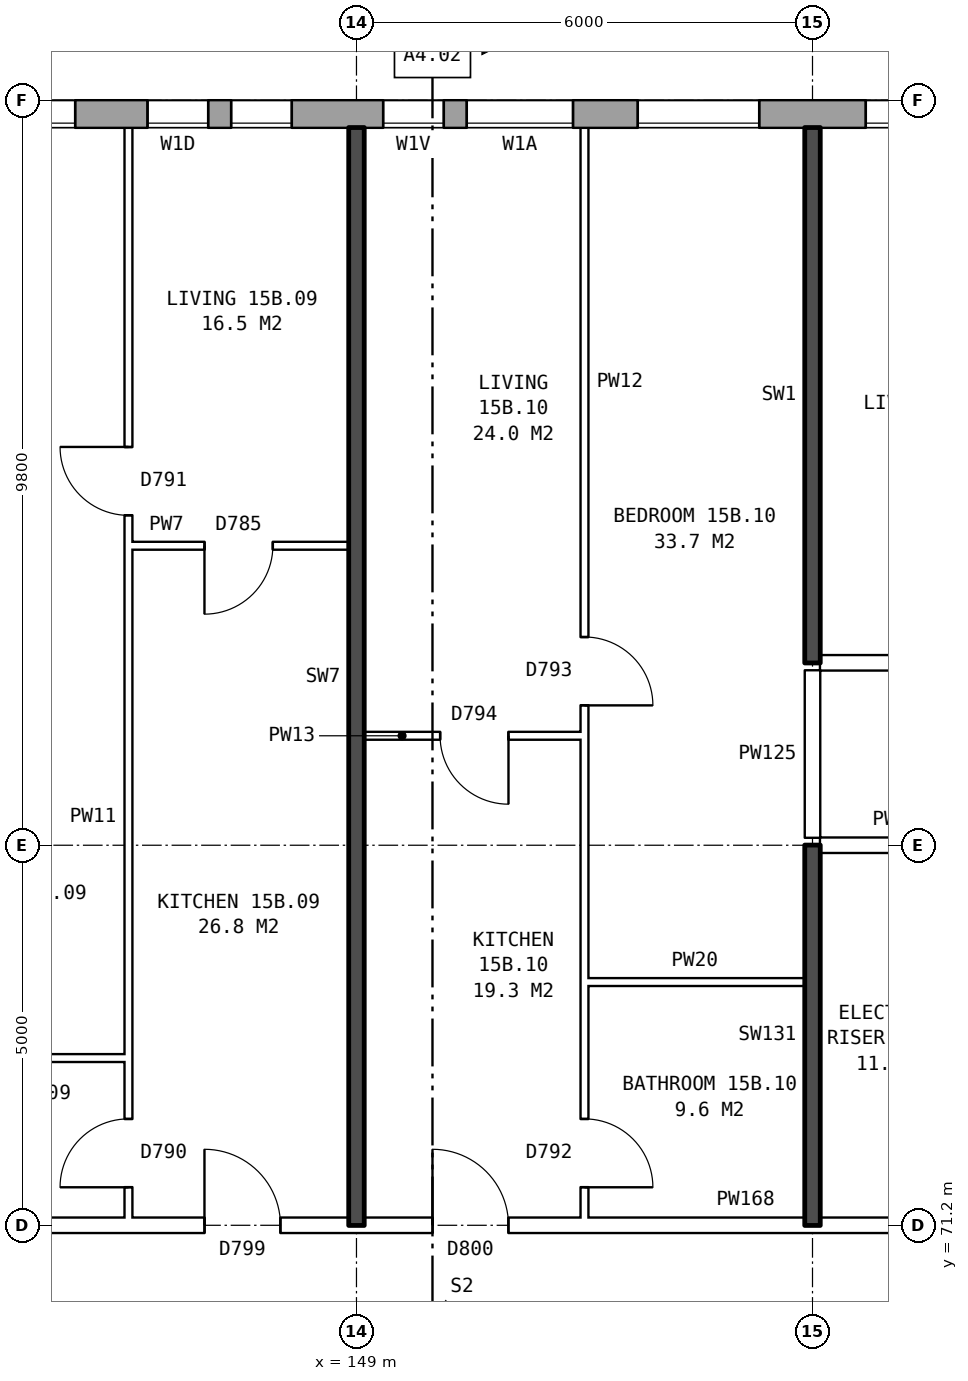
"""IFC4 building model, lengths in metres.
Left out: names, types, materials, properties, quantities, classifications, styles, units other than length and angle.
Written with IfcOpenShell. Run it as: python <this file> out.ifc"""

import sys

from ifc_helpers import new_model, si_unit, direction, frame, frame_2d, origin, place, context, subcontext, project, spatial, rectangle, extrude, element, fill, save


model = new_model("IFC4")
c1 = context("Model", 3, precision=1e-05, world=origin(), true_north=direction((0.0, 1.0)))
c2 = subcontext(c1, "Body", "Model", "MODEL_VIEW")
j1 = project(units=[si_unit("LENGTHUNIT", "METRE"), si_unit("PLANEANGLEUNIT", "RADIAN")], contexts=[c1])
p1 = place(None, origin())
s1 = spatial("IfcSite", under=j1, at=p1, CompositionType="ELEMENT")
p2 = place(p1, origin())
s2 = spatial("IfcBuilding", under=s1, at=p2, CompositionType="ELEMENT")
p3 = place(p2, frame((0.0, 0.0, 56.7)))
s3 = spatial("IfcBuildingStorey", under=s2, at=p3, CompositionType="ELEMENT", Elevation=56.7)
p4 = place(p3, frame((173.425, 85.82, 0.0), z_axis=(0.0, 0.0, 1.0), x_axis=(-1.0, 0.0, 0.0)))
e1 = element("IfcWall", 1, at=p4, inside=s3, PredefinedType="STANDARD", context=c2, shape_type="SweptSolid", body=[
    extrude(rectangle(XDim=39.351, YDim=0.36, at=frame_2d((19.675, 0.0))), origin(), (0.0, 0.0, 1.0), 2.85),
])
p5 = place(p4, frame((1.125, 0.0, 0.8)))
e2 = element("IfcOpeningElement", 2, at=p5, cuts=e1, PredefinedType="OPENING", context=c2, shape_type="SweptSolid", body=[
    extrude(rectangle(XDim=1.6, YDim=1.8, at=frame_2d((0.8, 0.9))), frame((0.0, 0.19, 0.0), z_axis=(0.0, -1.0, 0.0), x_axis=(1.0, 0.0, 0.0)), (0.0, 0.0, 1.0), 0.38),
])
p6 = place(p4, frame((4.125, 0.0, 0.8)))
e3 = element("IfcOpeningElement", 3, at=p6, cuts=e1, PredefinedType="OPENING", context=c2, shape_type="SweptSolid", body=[
    extrude(rectangle(XDim=1.6, YDim=1.8, at=frame_2d((0.8, 0.9))), frame((0.0, 0.19, 0.0), z_axis=(0.0, -1.0, 0.0), x_axis=(1.0, 0.0, 0.0)), (0.0, 0.0, 1.0), 0.38),
])
p7 = place(p4, frame((7.125, 0.0, 0.8)))
e4 = element("IfcOpeningElement", 4, at=p7, cuts=e1, PredefinedType="OPENING", context=c2, shape_type="SweptSolid", body=[
    extrude(rectangle(XDim=1.6, YDim=1.8, at=frame_2d((0.8, 0.9))), frame((0.0, 0.19, 0.0), z_axis=(0.0, -1.0, 0.0), x_axis=(1.0, 0.0, 0.0)), (0.0, 0.0, 1.0), 0.38),
])
p8 = place(p4, frame((10.125, 0.0, 0.8)))
e5 = element("IfcOpeningElement", 5, at=p8, cuts=e1, PredefinedType="OPENING", context=c2, shape_type="SweptSolid", body=[
    extrude(rectangle(XDim=1.6, YDim=1.8, at=frame_2d((0.8, 0.9))), frame((0.0, 0.19, 0.0), z_axis=(0.0, -1.0, 0.0), x_axis=(1.0, 0.0, 0.0)), (0.0, 0.0, 1.0), 0.38),
])
p9 = place(p4, frame((12.625, 0.0, 1.25)))
e6 = element("IfcOpeningElement", 6, at=p9, cuts=e1, PredefinedType="OPENING", context=c2, shape_type="SweptSolid", body=[
    extrude(rectangle(XDim=0.8, YDim=1.2, at=frame_2d((0.4, 0.6))), frame((0.0, 0.19, 0.0), z_axis=(0.0, -1.0, 0.0), x_axis=(1.0, 0.0, 0.0)), (0.0, 0.0, 1.0), 0.38),
])
p10 = place(p4, frame((16.125, 0.0, 0.8)))
e7 = element("IfcOpeningElement", 7, at=p10, cuts=e1, PredefinedType="OPENING", context=c2, shape_type="SweptSolid", body=[
    extrude(rectangle(XDim=1.6, YDim=1.8, at=frame_2d((0.8, 0.9))), frame((0.0, 0.19, 0.0), z_axis=(0.0, -1.0, 0.0), x_axis=(1.0, 0.0, 0.0)), (0.0, 0.0, 1.0), 0.38),
])
p11 = place(p4, frame((19.125, 0.0, 0.8)))
e8 = element("IfcOpeningElement", 8, at=p11, cuts=e1, PredefinedType="OPENING", context=c2, shape_type="SweptSolid", body=[
    extrude(rectangle(XDim=1.6, YDim=1.8, at=frame_2d((0.8, 0.9))), frame((0.0, 0.19, 0.0), z_axis=(0.0, -1.0, 0.0), x_axis=(1.0, 0.0, 0.0)), (0.0, 0.0, 1.0), 0.38),
])
p12 = place(p4, frame((21.575, 0.0, 0.8)))
e9 = element("IfcOpeningElement", 9, at=p12, cuts=e1, PredefinedType="OPENING", context=c2, shape_type="SweptSolid", body=[
    extrude(rectangle(XDim=1.4, YDim=1.8, at=frame_2d((0.7, 0.9))), frame((0.0, 0.19, 0.0), z_axis=(0.0, -1.0, 0.0), x_axis=(1.0, 0.0, 0.0)), (0.0, 0.0, 1.0), 0.38),
])
p13 = place(p4, frame((25.275, 0.0, 1.7)))
e10 = element("IfcOpeningElement", 10, at=p13, cuts=e1, PredefinedType="OPENING", context=c2, shape_type="SweptSolid", body=[
    extrude(rectangle(XDim=0.8, YDim=0.9, at=frame_2d((0.4, 0.45))), frame((0.0, 0.19, 0.0), z_axis=(0.0, -1.0, 0.0), x_axis=(1.0, 0.0, 0.0)), (0.0, 0.0, 1.0), 0.38),
])
p14 = place(p4, frame((28.125, 0.0, 0.8)))
e11 = element("IfcOpeningElement", 11, at=p14, cuts=e1, PredefinedType="OPENING", context=c2, shape_type="SweptSolid", body=[
    extrude(rectangle(XDim=1.6, YDim=1.8, at=frame_2d((0.8, 0.9))), frame((0.0, 0.19, 0.0), z_axis=(0.0, -1.0, 0.0), x_axis=(1.0, 0.0, 0.0)), (0.0, 0.0, 1.0), 0.38),
])
p15 = place(p4, frame((31.125, 0.0, 0.8)))
e12 = element("IfcOpeningElement", 12, at=p15, cuts=e1, PredefinedType="OPENING", context=c2, shape_type="SweptSolid", body=[
    extrude(rectangle(XDim=1.6, YDim=1.8, at=frame_2d((0.8, 0.9))), frame((0.0, 0.19, 0.0), z_axis=(0.0, -1.0, 0.0), x_axis=(1.0, 0.0, 0.0)), (0.0, 0.0, 1.0), 0.38),
])
p16 = place(p4, frame((34.125, 0.0, 0.8)))
e13 = element("IfcOpeningElement", 13, at=p16, cuts=e1, PredefinedType="OPENING", context=c2, shape_type="SweptSolid", body=[
    extrude(rectangle(XDim=1.6, YDim=1.8, at=frame_2d((0.8, 0.9))), frame((0.0, 0.19, 0.0), z_axis=(0.0, -1.0, 0.0), x_axis=(1.0, 0.0, 0.0)), (0.0, 0.0, 1.0), 0.38),
])
p17 = place(p4, frame((37.125, 0.0, 0.8)))
e14 = element("IfcOpeningElement", 14, at=p17, cuts=e1, PredefinedType="OPENING", context=c2, shape_type="SweptSolid", body=[
    extrude(rectangle(XDim=1.6, YDim=1.8, at=frame_2d((0.8, 0.9))), frame((0.0, 0.19, 0.0), z_axis=(0.0, -1.0, 0.0), x_axis=(1.0, 0.0, 0.0)), (0.0, 0.0, 1.0), 0.38),
])
p18 = place(p4, frame((15.125, 0.0, 0.65)))
e15 = element("IfcOpeningElement", 15, at=p18, cuts=e1, PredefinedType="OPENING", context=c2, shape_type="SweptSolid", body=[
    extrude(rectangle(XDim=0.6, YDim=0.9, at=frame_2d((0.3, 0.45))), frame((0.0, 0.19, 0.0), z_axis=(0.0, -1.0, 0.0), x_axis=(1.0, 0.0, 0.0)), (0.0, 0.0, 1.0), 0.38),
])
p19 = place(p4, frame((23.275, 0.0, 0.8)))
e16 = element("IfcOpeningElement", 16, at=p19, cuts=e1, PredefinedType="OPENING", context=c2, shape_type="SweptSolid", body=[
    extrude(rectangle(XDim=0.8, YDim=0.9, at=frame_2d((0.4, 0.45))), frame((0.0, 0.19, 0.0), z_axis=(0.0, -1.0, 0.0), x_axis=(1.0, 0.0, 0.0)), (0.0, 0.0, 1.0), 0.38),
])
p20 = place(p4, frame((26.375, 0.0, 0.8)))
e17 = element("IfcOpeningElement", 17, at=p20, cuts=e1, PredefinedType="OPENING", context=c2, shape_type="SweptSolid", body=[
    extrude(rectangle(XDim=0.8, YDim=1.8, at=frame_2d((0.4, 0.9))), frame((0.0, 0.19, 0.0), z_axis=(0.0, -1.0, 0.0), x_axis=(1.0, 0.0, 0.0)), (0.0, 0.0, 1.0), 0.38),
])
p21 = place(p3, frame((142.76, 71.2, 0.0), z_axis=(0.0, 0.0, 1.0), x_axis=(1.0, 0.0, 0.0)))
e18 = element("IfcWall", 18, at=p21, inside=s3, PredefinedType="PARTITIONING", context=c2, shape_type="SweptSolid", body=[
    extrude(rectangle(XDim=14.48, YDim=0.2, at=frame_2d((7.24, 0.0))), origin(), (0.0, 0.0, 1.0), 2.85),
])
p22 = place(p21, frame((4.24, 0.0, 0.0)))
e19 = element("IfcOpeningElement", 19, at=p22, cuts=e18, PredefinedType="OPENING", context=c2, shape_type="SweptSolid", body=[
    extrude(rectangle(XDim=1.0, YDim=2.1, at=frame_2d((0.5, 1.05))), frame((0.0, 0.11, 0.0), z_axis=(0.0, -1.0, 0.0), x_axis=(1.0, 0.0, 0.0)), (0.0, 0.0, 1.0), 0.22),
])
p23 = place(p21, frame((7.24, 0.0, 0.0)))
e20 = element("IfcOpeningElement", 20, at=p23, cuts=e18, PredefinedType="OPENING", context=c2, shape_type="SweptSolid", body=[
    extrude(rectangle(XDim=1.0, YDim=2.1, at=frame_2d((0.5, 1.05))), frame((0.0, 0.11, 0.0), z_axis=(0.0, -1.0, 0.0), x_axis=(1.0, 0.0, 0.0)), (0.0, 0.0, 1.0), 0.22),
])
p24 = place(p3, frame((142.76, 73.4, 0.0), z_axis=(0.0, 0.0, 1.0), x_axis=(1.0, 0.0, 0.0)))
e21 = element("IfcWall", 21, at=p24, inside=s3, PredefinedType="PARTITIONING", context=c2, shape_type="SweptSolid", body=[
    extrude(rectangle(XDim=3.24, YDim=0.1, at=frame_2d((1.62, 0.0))), origin(), (0.0, 0.0, 1.0), 2.85),
])
p25 = place(p3, frame((152.0, 74.4, 0.0), z_axis=(0.0, 0.0, 1.0), x_axis=(1.0, 0.0, 0.0)))
e22 = element("IfcWall", 22, at=p25, inside=s3, PredefinedType="PARTITIONING", context=c2, shape_type="SweptSolid", body=[
    extrude(rectangle(XDim=2.9, YDim=0.1, at=frame_2d((1.45, 0.0))), origin(), (0.0, 0.0, 1.0), 2.85),
])
p26 = place(p3, frame((155.1, 76.2, 0.0), z_axis=(0.0, 0.0, 1.0), x_axis=(1.0, 0.0, 0.0)))
e23 = element("IfcWall", 23, at=p26, inside=s3, PredefinedType="PARTITIONING", context=c2, shape_type="SweptSolid", body=[
    extrude(rectangle(XDim=2.14, YDim=0.2, at=frame_2d((1.07, 0.0))), origin(), (0.0, 0.0, 1.0), 2.85),
])
p27 = place(p3, frame((149.1, 77.64, 0.0), z_axis=(0.0, 0.0, 1.0), x_axis=(1.0, 0.0, 0.0)))
e24 = element("IfcWall", 24, at=p27, inside=s3, PredefinedType="PARTITIONING", context=c2, shape_type="SweptSolid", body=[
    extrude(rectangle(XDim=2.9, YDim=0.1, at=frame_2d((1.45, 0.0))), origin(), (0.0, 0.0, 1.0), 2.85),
])
p28 = place(p27, frame((1.0, 0.0, 0.0)))
e25 = element("IfcOpeningElement", 25, at=p28, cuts=e24, PredefinedType="OPENING", context=c2, shape_type="SweptSolid", body=[
    extrude(rectangle(XDim=0.9, YDim=2.1, at=frame_2d((0.45, 1.05))), frame((0.0, 0.06, 0.0), z_axis=(0.0, -1.0, 0.0), x_axis=(1.0, 0.0, 0.0)), (0.0, 0.0, 1.0), 0.12),
])
p29 = place(p3, frame((155.1, 78.6, 0.0), z_axis=(0.0, 0.0, 1.0), x_axis=(1.0, 0.0, 0.0)))
e26 = element("IfcWall", 26, at=p29, inside=s3, PredefinedType="PARTITIONING", context=c2, shape_type="SweptSolid", body=[
    extrude(rectangle(XDim=21.04, YDim=0.2, at=frame_2d((10.52, 0.0))), origin(), (0.0, 0.0, 1.0), 2.85),
])
p30 = place(p29, frame((2.45, 0.0, 0.0)))
e27 = element("IfcOpeningElement", 27, at=p30, cuts=e26, PredefinedType="OPENING", context=c2, shape_type="SweptSolid", body=[
    extrude(rectangle(XDim=1.0, YDim=2.1, at=frame_2d((0.5, 1.05))), frame((0.0, 0.11, 0.0), z_axis=(0.0, -1.0, 0.0), x_axis=(1.0, 0.0, 0.0)), (0.0, 0.0, 1.0), 0.22),
])
p31 = place(p29, frame((14.4, 0.0, 0.0)))
e28 = element("IfcOpeningElement", 28, at=p31, cuts=e26, PredefinedType="OPENING", context=c2, shape_type="SweptSolid", body=[
    extrude(rectangle(XDim=1.0, YDim=2.1, at=frame_2d((0.5, 1.05))), frame((0.0, 0.11, 0.0), z_axis=(0.0, -1.0, 0.0), x_axis=(1.0, 0.0, 0.0)), (0.0, 0.0, 1.0), 0.22),
])
p32 = place(p3, frame((146.0, 80.14, 0.0), z_axis=(0.0, 0.0, 1.0), x_axis=(1.0, 0.0, 0.0)))
e29 = element("IfcWall", 29, at=p32, inside=s3, PredefinedType="PARTITIONING", context=c2, shape_type="SweptSolid", body=[
    extrude(rectangle(XDim=2.9, YDim=0.1, at=frame_2d((1.45, 0.0))), origin(), (0.0, 0.0, 1.0), 2.85),
])
p33 = place(p32, frame((1.0, 0.0, 0.0)))
e30 = element("IfcOpeningElement", 30, at=p33, cuts=e29, PredefinedType="OPENING", context=c2, shape_type="SweptSolid", body=[
    extrude(rectangle(XDim=0.9, YDim=2.1, at=frame_2d((0.45, 1.05))), frame((0.0, 0.06, 0.0), z_axis=(0.0, -1.0, 0.0), x_axis=(1.0, 0.0, 0.0)), (0.0, 0.0, 1.0), 0.12),
])
p34 = place(p3, frame((146.0, 71.3, 0.0), z_axis=(0.0, 0.0, 1.0), x_axis=(0.0, 1.0, 0.0)))
e31 = element("IfcWall", 31, at=p34, inside=s3, PredefinedType="PARTITIONING", context=c2, shape_type="SweptSolid", body=[
    extrude(rectangle(XDim=14.34, YDim=0.1, at=frame_2d((7.17, 0.0))), origin(), (0.0, 0.0, 1.0), 2.85),
])
p35 = place(p34, frame((9.24, 0.0, 0.0)))
e32 = element("IfcOpeningElement", 32, at=p35, cuts=e31, PredefinedType="OPENING", context=c2, shape_type="SweptSolid", body=[
    extrude(rectangle(XDim=0.9, YDim=2.1, at=frame_2d((0.45, 1.05))), frame((0.0, 0.06, 0.0), z_axis=(0.0, -1.0, 0.0), x_axis=(1.0, 0.0, 0.0)), (0.0, 0.0, 1.0), 0.12),
])
p36 = place(p34, frame((0.4, 0.0, 0.0)))
e33 = element("IfcOpeningElement", 33, at=p36, cuts=e31, PredefinedType="OPENING", context=c2, shape_type="SweptSolid", body=[
    extrude(rectangle(XDim=0.9, YDim=2.1, at=frame_2d((0.45, 1.05))), frame((0.0, 0.06, 0.0), z_axis=(0.0, -1.0, 0.0), x_axis=(1.0, 0.0, 0.0)), (0.0, 0.0, 1.0), 0.12),
])
p37 = place(p3, frame((149.0, 71.2, 0.0), z_axis=(0.0, 0.0, 1.0), x_axis=(0.0, 1.0, 0.0)))
e34 = element("IfcWall", 34, at=p37, inside=s3, PredefinedType="SOLIDWALL", context=c2, shape_type="SweptSolid", body=[
    extrude(rectangle(XDim=14.44, YDim=0.2, at=frame_2d((7.22, 0.0))), origin(), (0.0, 0.0, 1.0), 2.85),
])
p38 = place(p3, frame((152.0, 71.3, 0.0), z_axis=(0.0, 0.0, 1.0), x_axis=(0.0, 1.0, 0.0)))
e35 = element("IfcWall", 35, at=p38, inside=s3, PredefinedType="PARTITIONING", context=c2, shape_type="SweptSolid", body=[
    extrude(rectangle(XDim=14.34, YDim=0.1, at=frame_2d((7.17, 0.0))), origin(), (0.0, 0.0, 1.0), 2.85),
])
p39 = place(p38, frame((6.74, 0.0, 0.0)))
e36 = element("IfcOpeningElement", 36, at=p39, cuts=e35, PredefinedType="OPENING", context=c2, shape_type="SweptSolid", body=[
    extrude(rectangle(XDim=0.9, YDim=2.1, at=frame_2d((0.45, 1.05))), frame((0.0, 0.06, 0.0), z_axis=(0.0, -1.0, 0.0), x_axis=(1.0, 0.0, 0.0)), (0.0, 0.0, 1.0), 0.12),
])
p40 = place(p38, frame((0.4, 0.0, 0.0)))
e37 = element("IfcOpeningElement", 37, at=p40, cuts=e35, PredefinedType="OPENING", context=c2, shape_type="SweptSolid", body=[
    extrude(rectangle(XDim=0.9, YDim=2.1, at=frame_2d((0.45, 1.05))), frame((0.0, 0.06, 0.0), z_axis=(0.0, -1.0, 0.0), x_axis=(1.0, 0.0, 0.0)), (0.0, 0.0, 1.0), 0.12),
])
p41 = place(p3, frame((155.0, 71.2, 0.0), z_axis=(0.0, 0.0, 1.0), x_axis=(0.0, 1.0, 0.0)))
e38 = element("IfcWall", 38, at=p41, inside=s3, PredefinedType="SOLIDWALL", context=c2, shape_type="SweptSolid", body=[
    extrude(rectangle(XDim=5.0, YDim=0.2, at=frame_2d((2.5, 0.0))), origin(), (0.0, 0.0, 1.0), 2.85),
])
p42 = place(p3, frame((155.0, 76.3, 0.0), z_axis=(0.0, 0.0, 1.0), x_axis=(0.0, 1.0, 0.0)))
e39 = element("IfcWall", 39, at=p42, inside=s3, PredefinedType="PARTITIONING", context=c2, shape_type="SweptSolid", body=[
    extrude(rectangle(XDim=2.2, YDim=0.2, at=frame_2d((1.1, 0.0))), origin(), (0.0, 0.0, 1.0), 2.85),
])
p43 = place(p3, frame((155.0, 78.6, 0.0), z_axis=(0.0, 0.0, 1.0), x_axis=(0.0, 1.0, 0.0)))
e40 = element("IfcWall", 40, at=p43, inside=s3, PredefinedType="SOLIDWALL", context=c2, shape_type="SweptSolid", body=[
    extrude(rectangle(XDim=7.04, YDim=0.2, at=frame_2d((3.52, 0.0))), origin(), (0.0, 0.0, 1.0), 2.85),
])
p44 = place(p10, origin())
e41 = element("IfcWindow", 41, at=p44, inside=s3, PartitioningType="SINGLE_PANEL", PredefinedType="WINDOW", context=c2, shape_type="SweptSolid", body=[
    extrude(rectangle(XDim=1.6, YDim=1.8, at=frame_2d((0.8, 0.9))), frame((0.0, 0.15, 0.0), z_axis=(0.0, -1.0, 0.0), x_axis=(1.0, 0.0, 0.0)), (0.0, 0.0, 1.0), 0.06),
])
fill(e7, e41)
p45 = place(p11, origin())
e42 = element("IfcWindow", 42, at=p45, inside=s3, PartitioningType="SINGLE_PANEL", PredefinedType="WINDOW", context=c2, shape_type="SweptSolid", body=[
    extrude(rectangle(XDim=1.6, YDim=1.8, at=frame_2d((0.8, 0.9))), frame((0.0, 0.15, 0.0), z_axis=(0.0, -1.0, 0.0), x_axis=(1.0, 0.0, 0.0)), (0.0, 0.0, 1.0), 0.06),
])
fill(e8, e42)
p46 = place(p12, origin())
e43 = element("IfcWindow", 43, at=p46, inside=s3, PartitioningType="SINGLE_PANEL", PredefinedType="WINDOW", context=c2, shape_type="SweptSolid", body=[
    extrude(rectangle(XDim=1.4, YDim=1.8, at=frame_2d((0.7, 0.9))), frame((0.0, 0.15, 0.0), z_axis=(0.0, -1.0, 0.0), x_axis=(1.0, 0.0, 0.0)), (0.0, 0.0, 1.0), 0.06),
])
fill(e9, e43)
p47 = place(p13, origin())
e44 = element("IfcWindow", 44, at=p47, inside=s3, PartitioningType="SINGLE_PANEL", PredefinedType="WINDOW", context=c2, shape_type="SweptSolid", body=[
    extrude(rectangle(XDim=0.8, YDim=0.9, at=frame_2d((0.4, 0.45))), frame((0.0, 0.15, 0.0), z_axis=(0.0, -1.0, 0.0), x_axis=(1.0, 0.0, 0.0)), (0.0, 0.0, 1.0), 0.06),
])
fill(e10, e44)
p48 = place(p14, origin())
e45 = element("IfcWindow", 45, at=p48, inside=s3, PartitioningType="SINGLE_PANEL", PredefinedType="WINDOW", context=c2, shape_type="SweptSolid", body=[
    extrude(rectangle(XDim=1.6, YDim=1.8, at=frame_2d((0.8, 0.9))), frame((0.0, 0.15, 0.0), z_axis=(0.0, -1.0, 0.0), x_axis=(1.0, 0.0, 0.0)), (0.0, 0.0, 1.0), 0.06),
])
fill(e11, e45)
p49 = place(p35, origin())
e46 = element("IfcDoor", 46, at=p49, inside=s3, OperationType="SINGLE_SWING_RIGHT", PredefinedType="DOOR", context=c2, shape_type="SweptSolid", body=[
    extrude(rectangle(XDim=0.9, YDim=2.1, at=frame_2d((0.45, 1.05))), frame((0.0, 0.025, 0.0), z_axis=(0.0, -1.0, 0.0), x_axis=(1.0, 0.0, 0.0)), (0.0, 0.0, 1.0), 0.05),
])
fill(e32, e46)
p50 = place(p22, origin())
e47 = element("IfcDoor", 47, at=p50, inside=s3, OperationType="SINGLE_SWING_LEFT", PredefinedType="DOOR", context=c2, shape_type="SweptSolid", body=[
    extrude(rectangle(XDim=1.0, YDim=2.1, at=frame_2d((0.5, 1.05))), frame((0.0, 0.025, 0.0), z_axis=(0.0, -1.0, 0.0), x_axis=(1.0, 0.0, 0.0)), (0.0, 0.0, 1.0), 0.05),
])
fill(e19, e47)
p51 = place(p33, frame((0.9, 0.0, 0.0), z_axis=(0.0, 0.0, 1.0), x_axis=(-1.0, 0.0, 0.0)))
e48 = element("IfcDoor", 48, at=p51, inside=s3, OperationType="SINGLE_SWING_RIGHT", PredefinedType="DOOR", context=c2, shape_type="SweptSolid", body=[
    extrude(rectangle(XDim=0.9, YDim=2.1, at=frame_2d((0.45, 1.05))), frame((0.0, 0.025, 0.0), z_axis=(0.0, -1.0, 0.0), x_axis=(1.0, 0.0, 0.0)), (0.0, 0.0, 1.0), 0.05),
])
fill(e30, e48)
p52 = place(p36, origin())
e49 = element("IfcDoor", 49, at=p52, inside=s3, OperationType="SINGLE_SWING_LEFT", PredefinedType="DOOR", context=c2, shape_type="SweptSolid", body=[
    extrude(rectangle(XDim=0.9, YDim=2.1, at=frame_2d((0.45, 1.05))), frame((0.0, 0.025, 0.0), z_axis=(0.0, -1.0, 0.0), x_axis=(1.0, 0.0, 0.0)), (0.0, 0.0, 1.0), 0.05),
])
fill(e33, e49)
p53 = place(p39, frame((0.9, 0.0, 0.0), z_axis=(0.0, 0.0, 1.0), x_axis=(-1.0, 0.0, 0.0)))
e50 = element("IfcDoor", 50, at=p53, inside=s3, OperationType="SINGLE_SWING_RIGHT", PredefinedType="DOOR", context=c2, shape_type="SweptSolid", body=[
    extrude(rectangle(XDim=0.9, YDim=2.1, at=frame_2d((0.45, 1.05))), frame((0.0, 0.025, 0.0), z_axis=(0.0, -1.0, 0.0), x_axis=(1.0, 0.0, 0.0)), (0.0, 0.0, 1.0), 0.05),
])
fill(e36, e50)
p54 = place(p23, origin())
e51 = element("IfcDoor", 51, at=p54, inside=s3, OperationType="SINGLE_SWING_LEFT", PredefinedType="DOOR", context=c2, shape_type="SweptSolid", body=[
    extrude(rectangle(XDim=1.0, YDim=2.1, at=frame_2d((0.5, 1.05))), frame((0.0, 0.025, 0.0), z_axis=(0.0, -1.0, 0.0), x_axis=(1.0, 0.0, 0.0)), (0.0, 0.0, 1.0), 0.05),
])
fill(e20, e51)
p55 = place(p28, frame((0.9, 0.0, 0.0), z_axis=(0.0, 0.0, 1.0), x_axis=(-1.0, 0.0, 0.0)))
e52 = element("IfcDoor", 52, at=p55, inside=s3, OperationType="SINGLE_SWING_LEFT", PredefinedType="DOOR", context=c2, shape_type="SweptSolid", body=[
    extrude(rectangle(XDim=0.9, YDim=2.1, at=frame_2d((0.45, 1.05))), frame((0.0, 0.025, 0.0), z_axis=(0.0, -1.0, 0.0), x_axis=(1.0, 0.0, 0.0)), (0.0, 0.0, 1.0), 0.05),
])
fill(e25, e52)
p56 = place(p40, frame((0.9, 0.0, 0.0), z_axis=(0.0, 0.0, 1.0), x_axis=(-1.0, 0.0, 0.0)))
e53 = element("IfcDoor", 53, at=p56, inside=s3, OperationType="SINGLE_SWING_RIGHT", PredefinedType="DOOR", context=c2, shape_type="SweptSolid", body=[
    extrude(rectangle(XDim=0.9, YDim=2.1, at=frame_2d((0.45, 1.05))), frame((0.0, 0.025, 0.0), z_axis=(0.0, -1.0, 0.0), x_axis=(1.0, 0.0, 0.0)), (0.0, 0.0, 1.0), 0.05),
])
fill(e37, e53)
p57 = place(p19, origin())
e54 = element("IfcWindow", 54, at=p57, inside=s3, PartitioningType="SINGLE_PANEL", PredefinedType="WINDOW", context=c2, shape_type="SweptSolid", body=[
    extrude(rectangle(XDim=0.8, YDim=0.9, at=frame_2d((0.4, 0.45))), frame((0.0, 0.15, 0.0), z_axis=(0.0, -1.0, 0.0), x_axis=(1.0, 0.0, 0.0)), (0.0, 0.0, 1.0), 0.06),
])
fill(e16, e54)
p58 = place(p20, origin())
e55 = element("IfcWindow", 55, at=p58, inside=s3, PartitioningType="SINGLE_PANEL", PredefinedType="WINDOW", context=c2, shape_type="SweptSolid", body=[
    extrude(rectangle(XDim=0.8, YDim=1.8, at=frame_2d((0.4, 0.9))), frame((0.0, 0.15, 0.0), z_axis=(0.0, -1.0, 0.0), x_axis=(1.0, 0.0, 0.0)), (0.0, 0.0, 1.0), 0.06),
])
fill(e17, e55)
save(model, sys.argv[1])
